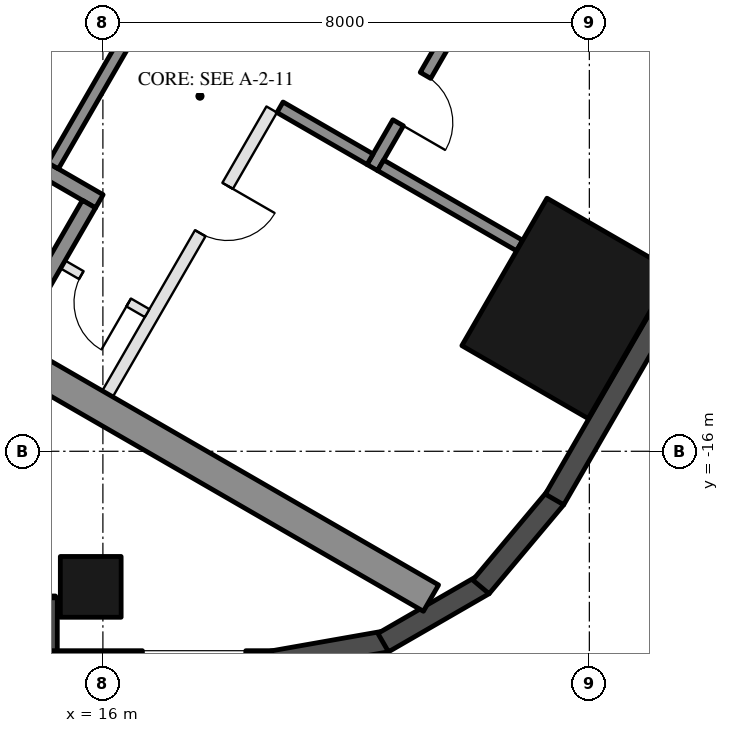
"""IFC4 building model, lengths in metres.
Left out: names, types, materials, properties, quantities, classifications, styles, units other than length and angle.
Written with IfcOpenShell. Run it as: python <this file> out.ifc"""

import sys

from ifc_helpers import new_model, si_unit, direction, frame, frame_2d, origin, origin_2d, place, context, subcontext, project, spatial, rectangle, hollow_rectangle, extrude, element, fill, save


model = new_model("IFC4")
c1 = context("Model", 3, precision=1e-05, world=origin(), true_north=direction((0.0, 1.0)))
c2 = subcontext(c1, "Body", "Model", "MODEL_VIEW")
j1 = project(units=[si_unit("LENGTHUNIT", "METRE"), si_unit("PLANEANGLEUNIT", "RADIAN")], contexts=[c1])
p1 = place(None, origin())
s1 = spatial("IfcSite", under=j1, at=p1, CompositionType="ELEMENT")
p2 = place(p1, origin())
s2 = spatial("IfcBuilding", under=s1, at=p2, CompositionType="ELEMENT")
p3 = place(p2, frame((0.0, 0.0, 53.9)))
s3 = spatial("IfcBuildingStorey", under=s2, at=p3, CompositionType="ELEMENT", Elevation=53.9)
p4 = place(p3, frame((15.8, -18.23, 0.0), z_axis=(0.0, 0.0, 1.0), x_axis=(-1.0, 0.0, 0.0)))
e1 = element("IfcColumn", 1, at=p4, inside=s3, PredefinedType="COLUMN", context=c2, shape_type="SweptSolid", body=[
    extrude(hollow_rectangle(XDim=1.0, YDim=1.0, WallThickness=0.045, at=origin_2d()), origin(), (0.0, 0.0, 1.0), 3.7),
])
p5 = place(p3, frame((23.643, -13.65, 0.0), z_axis=(0.0, 0.0, 1.0), x_axis=(0.5, 0.866025403784, 0.0)))
e2 = element("IfcColumn", 2, at=p5, inside=s3, PredefinedType="COLUMN", context=c2, shape_type="SweptSolid", body=[
    extrude(hollow_rectangle(XDim=2.8, YDim=2.4, WallThickness=0.07, at=origin_2d()), origin(), (0.0, 0.0, 1.0), 3.7),
])
p6 = place(p3, frame((8.48, -18.555, 0.0), z_axis=(0.0, 0.0, 1.0), x_axis=(1.0, 0.0, 0.0)))
e3 = element("IfcWall", 3, at=p6, inside=s3, PredefinedType="SOLIDWALL", context=c2, shape_type="SweptSolid", body=[
    extrude(rectangle(XDim=6.74, YDim=0.35, at=frame_2d((3.37, 0.0))), origin(), (0.0, 0.0, 1.0), 3.55),
])
p7 = place(p6, frame((3.57, 0.0, 0.0)))
e4 = element("IfcOpeningElement", 4, at=p7, cuts=e3, PredefinedType="OPENING", context=c2, shape_type="SweptSolid", body=[
    extrude(rectangle(XDim=2.4, YDim=2.4, at=frame_2d((1.2, 1.2))), frame((0.0, 0.185, 0.0), z_axis=(0.0, -1.0, 0.0), x_axis=(1.0, 0.0, 0.0)), (0.0, 0.0, 1.0), 0.37),
])
p8 = place(p6, frame((0.77, 0.0, 0.3)))
e5 = element("IfcOpeningElement", 5, at=p8, cuts=e3, PredefinedType="OPENING", context=c2, shape_type="SweptSolid", body=[
    extrude(rectangle(XDim=2.5, YDim=2.65, at=frame_2d((1.25, 1.325))), frame((0.0, 0.185, 0.0), z_axis=(0.0, -1.0, 0.0), x_axis=(1.0, 0.0, 0.0)), (0.0, 0.0, 1.0), 0.37),
])
p9 = place(p3, frame((15.075, -18.41, 0.0), z_axis=(0.0, 0.0, 1.0), x_axis=(0.0, -1.0, 0.0)))
e6 = element("IfcWall", 6, at=p9, inside=s3, PredefinedType="SOLIDWALL", context=c2, shape_type="SweptSolid", body=[
    extrude(rectangle(XDim=1.22, YDim=0.35, at=frame_2d((0.61, 0.0))), origin(), (0.0, 0.0, 1.0), 3.55),
])
p10 = place(p3, frame((14.9, -19.455, 0.0), z_axis=(0.0, 0.0, 1.0), x_axis=(1.0, 0.0, 0.0)))
e7 = element("IfcWall", 7, at=p10, inside=s3, PredefinedType="SOLIDWALL", context=c2, shape_type="SweptSolid", body=[
    extrude(rectangle(XDim=3.916, YDim=0.35, at=frame_2d((1.958, 0.0))), origin(), (0.0, 0.0, 1.0), 3.55),
])
p11 = place(p10, frame((1.75, 0.0, 0.3)))
e8 = element("IfcOpeningElement", 8, at=p11, cuts=e7, PredefinedType="OPENING", context=c2, shape_type="SweptSolid", body=[
    extrude(rectangle(XDim=1.7, YDim=2.65, at=frame_2d((0.85, 1.325))), frame((0.0, 0.185, 0.0), z_axis=(0.0, -1.0, 0.0), x_axis=(1.0, 0.0, 0.0)), (0.0, 0.0, 1.0), 0.37),
])
p12 = place(p3, frame((18.785, -19.458, 0.0), z_axis=(0.0, 0.0, 1.0), x_axis=(0.984798995425, 0.173697837091, 0.0)))
e9 = element("IfcWall", 9, at=p12, inside=s3, PredefinedType="SOLIDWALL", context=c2, shape_type="SweptSolid", body=[
    extrude(rectangle(XDim=1.91, YDim=0.35, at=frame_2d((0.955, 0.0))), origin(), (0.0, 0.0, 1.0), 3.55),
])
for number, where, z_axis, x_axis in (
    (10, (20.61, -19.147, 0.0), (0.0, 0.0, 1.0), (0.866, 0.5, 0.0)),
    (11, (22.217, -18.231, 0.0), (0.0, 0.0, 1.0), (0.643, 0.766, 0.0)),
):
    element("IfcWall", number, at=place(p3, frame(where, z_axis=z_axis, x_axis=x_axis)), inside=s3, PredefinedType="SOLIDWALL", context=c2, shape_type="SweptSolid", body=[
        extrude(rectangle(XDim=1.91, YDim=0.35, at=frame_2d((0.955, 0.0))), origin(), (0.0, 0.0, 1.0), 3.55),
    ])
p13 = place(p3, frame((23.427, -16.792, 0.0), z_axis=(0.0, 0.0, 1.0), x_axis=(0.500018773155, 0.866014564827, 0.0)))
e12 = element("IfcWall", 12, at=p13, inside=s3, PredefinedType="SOLIDWALL", context=c2, shape_type="SweptSolid", body=[
    extrude(rectangle(XDim=5.658, YDim=0.35, at=frame_2d((2.829, 0.0))), origin(), (0.0, 0.0, 1.0), 3.55),
])
for number, where, z_axis, x_axis in (
    (13, (8.547, -10.997, 0.0), (0.0, 0.0, 1.0), (0.866, -0.5, 0.0)),
    (14, (13.797, -1.903, 0.0), (0.0, 0.0, 1.0), (0.866, -0.5, 0.0)),
):
    element("IfcWall", number, at=place(p3, frame(where, z_axis=z_axis, x_axis=x_axis)), inside=s3, PredefinedType="SHEAR", context=c2, shape_type="SweptSolid", body=[
        extrude(rectangle(XDim=14.837, YDim=0.5, at=frame_2d((7.418, 0.0))), origin(), (0.0, 0.0, 1.0), 3.5),
    ])
p14 = place(p3, frame((10.356, -8.664, 0.0), z_axis=(0.0, 0.0, 1.0), x_axis=(0.866028629588, -0.499994412703, 0.0)))
e15 = element("IfcWall", 15, at=p14, inside=s3, PredefinedType="SHEAR", context=c2, shape_type="SweptSolid", body=[
    extrude(rectangle(XDim=6.45, YDim=0.25, at=frame_2d((3.225, 0.0))), origin(), (0.0, 0.0, 1.0), 3.5),
])
p15 = place(p14, frame((0.3, 0.0, 0.0)))
e16 = element("IfcOpeningElement", 16, at=p15, cuts=e15, PredefinedType="OPENING", context=c2, shape_type="SweptSolid", body=[
    extrude(rectangle(XDim=1.0, YDim=2.1, at=frame_2d((0.5, 1.05))), frame((0.0, 0.135, 0.0), z_axis=(0.0, -1.0, 0.0), x_axis=(1.0, 0.0, 0.0)), (0.0, 0.0, 1.0), 0.27),
])
p16 = place(p3, frame((14.496, -14.143, 0.0), z_axis=(0.0, 0.0, 1.0), x_axis=(0.500062241894, 0.865989465428, 0.0)))
e17 = element("IfcWall", 17, at=p16, inside=s3, PredefinedType="SHEAR", context=c2, shape_type="SweptSolid", body=[
    extrude(rectangle(XDim=2.55, YDim=0.25, at=frame_2d((1.275, 0.0))), origin(), (0.0, 0.0, 1.0), 3.5),
])
p17 = place(p3, frame((15.181, -11.305, 0.0), z_axis=(0.0, 0.0, 1.0), x_axis=(0.49994636267, 0.866056369097, 0.0)))
e18 = element("IfcWall", 18, at=p17, inside=s3, PredefinedType="SHEAR", context=c2, shape_type="SweptSolid", body=[
    extrude(rectangle(XDim=2.8, YDim=0.2, at=frame_2d((1.4, 0.0))), origin(), (0.0, 0.0, 1.0), 3.5),
])
p18 = place(p3, frame((20.43, -11.333, 0.0), z_axis=(0.0, 0.0, 1.0), x_axis=(0.500001309137, 0.866024647952, 0.0)))
e19 = element("IfcWall", 19, at=p18, inside=s3, PredefinedType="SHEAR", context=c2, shape_type="SweptSolid", body=[
    extrude(rectangle(XDim=2.4, YDim=0.2, at=frame_2d((1.2, 0.0))), origin(), (0.0, 0.0, 1.0), 3.5),
])
p19 = place(p18, frame((0.85, 0.0, 0.0)))
e20 = element("IfcOpeningElement", 20, at=p19, cuts=e19, PredefinedType="OPENING", context=c2, shape_type="SweptSolid", body=[
    extrude(rectangle(XDim=0.9, YDim=2.1, at=frame_2d((0.45, 1.05))), frame((0.0, 0.11, 0.0), z_axis=(0.0, -1.0, 0.0), x_axis=(1.0, 0.0, 0.0)), (0.0, 0.0, 1.0), 0.22),
])
p20 = place(p3, frame((18.913, -10.342, 0.0), z_axis=(0.0, 0.0, 1.0), x_axis=(0.866038183914, -0.499977863513, 0.0)))
e21 = element("IfcWall", 21, at=p20, inside=s3, PredefinedType="SHEAR", context=c2, shape_type="SweptSolid", body=[
    extrude(rectangle(XDim=1.71, YDim=0.2, at=frame_2d((0.855, 0.0))), origin(), (0.0, 0.0, 1.0), 3.5),
])
p21 = place(p3, frame((20.567, -11.297, 0.0), z_axis=(0.0, 0.0, 1.0), x_axis=(0.866060851709, -0.499938597367, 0.0)))
e22 = element("IfcWall", 22, at=p21, inside=s3, PredefinedType="SHEAR", context=c2, shape_type="SweptSolid", body=[
    extrude(rectangle(XDim=2.64, YDim=0.2, at=frame_2d((1.32, 0.0))), origin(), (0.0, 0.0, 1.0), 3.5),
])
p22 = place(p3, frame((16.076, -15.055, 0.0), z_axis=(0.0, 0.0, 1.0), x_axis=(0.499995103361, 0.866028230842, 0.0)))
e23 = element("IfcWall", 23, at=p22, inside=s3, PredefinedType="PARTITIONING", context=c2, shape_type="SweptSolid", body=[
    extrude(rectangle(XDim=5.4, YDim=0.2, at=frame_2d((2.7, 0.0))), origin(), (0.0, 0.0, 1.0), 3.5),
])
p23 = place(p22, frame((3.05, 0.0, 0.0)))
e24 = element("IfcOpeningElement", 24, at=p23, cuts=e23, PredefinedType="OPENING", context=c2, shape_type="SweptSolid", body=[
    extrude(rectangle(XDim=0.9, YDim=2.1, at=frame_2d((0.45, 1.05))), frame((0.0, 0.11, 0.0), z_axis=(0.0, -1.0, 0.0), x_axis=(1.0, 0.0, 0.0)), (0.0, 0.0, 1.0), 0.22),
])
p24 = place(p3, frame((15.342, -12.928, 0.0), z_axis=(0.0, 0.0, 1.0), x_axis=(0.865989903783, -0.500061482766, 0.0)))
e25 = element("IfcWall", 25, at=p24, inside=s3, PredefinedType="PARTITIONING", context=c2, shape_type="SweptSolid", body=[
    extrude(rectangle(XDim=1.6, YDim=0.15, at=frame_2d((0.8, 0.0))), origin(), (0.0, 0.0, 1.0), 3.5),
])
p25 = place(p24, frame((0.35, 0.0, 0.0)))
e26 = element("IfcOpeningElement", 26, at=p25, cuts=e25, PredefinedType="OPENING", context=c2, shape_type="SweptSolid", body=[
    extrude(rectangle(XDim=0.9, YDim=2.1, at=frame_2d((0.45, 1.05))), frame((0.0, 0.085, 0.0), z_axis=(0.0, -1.0, 0.0), x_axis=(1.0, 0.0, 0.0)), (0.0, 0.0, 1.0), 0.17),
])
p26 = place(p25, frame((0.9, 0.0, 0.0), z_axis=(0.0, 0.0, 1.0), x_axis=(-1.0, 0.0, 0.0)))
e27 = element("IfcDoor", 27, at=p26, inside=s3, OperationType="SINGLE_SWING_LEFT", PredefinedType="DOOR", context=c2, shape_type="SweptSolid", body=[
    extrude(rectangle(XDim=0.9, YDim=2.1, at=frame_2d((0.45, 1.05))), frame((0.0, 0.025, 0.0), z_axis=(0.0, -1.0, 0.0), x_axis=(1.0, 0.0, 0.0)), (0.0, 0.0, 1.0), 0.05),
])
fill(e26, e27)
p27 = place(p19, frame((0.9, 0.0, 0.0), z_axis=(0.0, 0.0, 1.0), x_axis=(-1.0, 0.0, 0.0)))
e28 = element("IfcDoor", 28, at=p27, inside=s3, OperationType="SINGLE_SWING_RIGHT", PredefinedType="DOOR", context=c2, shape_type="SweptSolid", body=[
    extrude(rectangle(XDim=0.9, YDim=2.1, at=frame_2d((0.45, 1.05))), frame((0.0, 0.025, 0.0), z_axis=(0.0, -1.0, 0.0), x_axis=(1.0, 0.0, 0.0)), (0.0, 0.0, 1.0), 0.05),
])
fill(e20, e28)
p28 = place(p23, frame((0.9, 0.0, 0.0), z_axis=(0.0, 0.0, 1.0), x_axis=(-1.0, 0.0, 0.0)))
e29 = element("IfcDoor", 29, at=p28, inside=s3, OperationType="SINGLE_SWING_LEFT", PredefinedType="DOOR", context=c2, shape_type="SweptSolid", body=[
    extrude(rectangle(XDim=0.9, YDim=2.1, at=frame_2d((0.45, 1.05))), frame((0.0, 0.025, 0.0), z_axis=(0.0, -1.0, 0.0), x_axis=(1.0, 0.0, 0.0)), (0.0, 0.0, 1.0), 0.05),
])
fill(e24, e29)
save(model, sys.argv[1])
